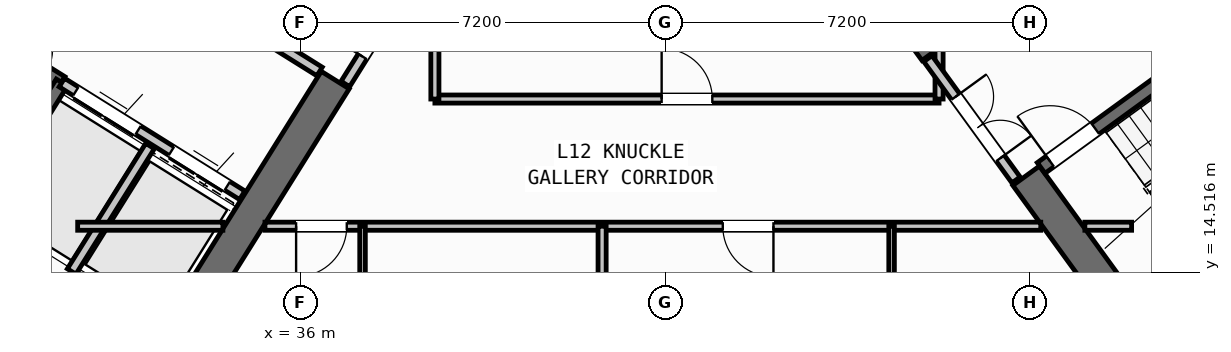
"""IFC4 building model, lengths in metres.
Left out: names, types, materials, properties, quantities, classifications, styles, units other than length and angle.
Written with IfcOpenShell. Run it as: python <this file> out.ifc"""

import sys

from ifc_helpers import new_model, si_unit, direction, frame, frame_2d, origin, place, context, subcontext, project, spatial, rectangle, extrude, source, transform, mapped, element, fill, save


model = new_model("IFC4")
c1 = context("Model", 3, precision=1e-05, world=origin(), true_north=direction((0.0, 1.0)))
c2 = subcontext(c1, "Body", "Model", "MODEL_VIEW")
j1 = project(units=[si_unit("LENGTHUNIT", "METRE"), si_unit("PLANEANGLEUNIT", "RADIAN")], contexts=[c1])
p1 = place(None, origin())
s1 = spatial("IfcSite", under=j1, at=p1, CompositionType="ELEMENT")
p2 = place(p1, origin())
s2 = spatial("IfcBuilding", under=s1, at=p2, CompositionType="ELEMENT")
p3 = place(p2, frame((0.0, 0.0, 49.2)))
s3 = spatial("IfcBuildingStorey", under=s2, at=p3, CompositionType="ELEMENT", Elevation=49.2)
p4 = place(p3, frame((33.409, 12.45, 0.0), z_axis=(0.0, 0.0, 1.0), x_axis=(-0.848051132073, 0.529914405721, 0.0)))
e1 = element("IfcWall", 1, at=p4, inside=s3, PredefinedType="SHEAR", context=c2, shape_type="SweptSolid", body=[
    extrude(rectangle(XDim=13.24, YDim=0.65, at=frame_2d((6.62, 0.0))), origin(), (0.0, 0.0, 1.0), 3.35),
])
p5 = place(p3, frame((36.683, 18.304, 0.0), z_axis=(0.0, 0.0, 1.0), x_axis=(-0.529899109053, -0.848060690178, 0.0)))
e2 = element("IfcWall", 2, at=p5, inside=s3, PredefinedType="SHEAR", context=c2, shape_type="SweptSolid", body=[
    extrude(rectangle(XDim=6.375, YDim=0.65, at=frame_2d((3.188, 0.0))), origin(), (0.0, 0.0, 1.0), 3.35),
])
p6 = place(p3, frame((52.318, 13.11, 0.0), z_axis=(0.0, 0.0, 1.0), x_axis=(0.809019445368, 0.587781878776, 0.0)))
e3 = element("IfcWall", 3, at=p6, inside=s3, PredefinedType="SHEAR", context=c2, shape_type="SweptSolid", body=[
    extrude(rectangle(XDim=12.44, YDim=0.65, at=frame_2d((6.22, 0.0))), origin(), (0.0, 0.0, 1.0), 3.35),
])
p7 = place(p3, frame((52.39, 13.564, 0.0), z_axis=(0.0, 0.0, 1.0), x_axis=(-0.58779688989, 0.809008539037, 0.0)))
e4 = element("IfcWall", 4, at=p7, inside=s3, PredefinedType="SHEAR", context=c2, shape_type="SweptSolid", body=[
    extrude(rectangle(XDim=3.525, YDim=0.65, at=frame_2d((1.763, 0.0))), origin(), (0.0, 0.0, 1.0), 3.35),
])
p8 = place(p3, frame((48.526, 18.884, 0.0), z_axis=(0.0, 0.0, 1.0), x_axis=(-0.58777996584, 0.809020835181, 0.0)))
e5 = element("IfcWall", 5, at=p8, inside=s3, PredefinedType="SHEAR", context=c2, shape_type="SweptSolid", body=[
    extrude(rectangle(XDim=6.375, YDim=0.65, at=frame_2d((3.188, 0.0))), origin(), (0.0, 0.0, 1.0), 3.35),
])
p9 = place(p3, frame((31.28, 18.261, 0.0), z_axis=(0.0, 0.0, 1.0), x_axis=(-0.848051618787, 0.529913626805, 0.0)))
e6 = element("IfcWall", 6, at=p9, inside=s3, PredefinedType="SHEAR", context=c2, shape_type="SweptSolid", body=[
    extrude(rectangle(XDim=7.46, YDim=0.26, at=frame_2d((3.73, 0.0))), origin(), (0.0, 0.0, 1.0), 3.35),
])
p10 = place(p9, frame((0.36, 0.0, 0.0)))
e7 = element("IfcOpeningElement", 7, at=p10, cuts=e6, PredefinedType="OPENING", context=c2, shape_type="SweptSolid", body=[
    extrude(rectangle(XDim=0.86, YDim=2.05, at=frame_2d((0.43, 1.025))), frame((0.0, 0.14, 0.0), z_axis=(0.0, -1.0, 0.0), x_axis=(1.0, 0.0, 0.0)), (0.0, 0.0, 1.0), 0.28),
])
p11 = place(p3, frame((31.288, 18.256, 0.0), z_axis=(0.0, 0.0, 1.0), x_axis=(-0.529943379326, -0.848033026897, 0.0)))
e8 = element("IfcWall", 8, at=p11, inside=s3, PredefinedType="SHEAR", context=c2, shape_type="SweptSolid", body=[
    extrude(rectangle(XDim=3.16, YDim=0.26, at=frame_2d((1.58, 0.0))), origin(), (0.0, 0.0, 1.0), 3.35),
])
p12 = place(p3, frame((34.848, 16.031, 0.0), z_axis=(0.0, 0.0, 1.0), x_axis=(-0.848044042236, 0.529925751807, 0.0)))
e9 = element("IfcWall", 9, at=p12, inside=s3, PredefinedType="STANDARD", context=c2, shape_type="SweptSolid", body=[
    extrude(rectangle(XDim=4.198, YDim=0.2, at=frame_2d((2.099, 0.0))), origin(), (0.0, 0.0, 1.0), 3.34),
])
p13 = place(p12, frame((0.348, 0.0, 0.0)))
e10 = element("IfcOpeningElement", 10, at=p13, cuts=e9, PredefinedType="OPENING", context=c2, shape_type="SweptSolid", body=[
    extrude(rectangle(XDim=1.3, YDim=2.2, at=frame_2d((0.65, 1.1))), frame((0.0, 0.11, 0.0), z_axis=(0.0, -1.0, 0.0), x_axis=(1.0, 0.0, 0.0)), (0.0, 0.0, 1.0), 0.22),
])
p14 = place(p12, frame((2.423, 0.0, 0.0)))
e11 = element("IfcOpeningElement", 11, at=p14, cuts=e9, PredefinedType="OPENING", context=c2, shape_type="SweptSolid", body=[
    extrude(rectangle(XDim=1.45, YDim=2.25, at=frame_2d((0.725, 1.125))), frame((0.0, 0.11, 0.0), z_axis=(0.0, -1.0, 0.0), x_axis=(1.0, 0.0, 0.0)), (0.0, 0.0, 1.0), 0.22),
])
p15 = place(p3, frame((36.374, 18.474, 0.0), z_axis=(0.0, 0.0, 1.0), x_axis=(-0.848051071577, 0.529914502535, 0.0)))
e12 = element("IfcWall", 12, at=p15, inside=s3, PredefinedType="STANDARD", context=c2, shape_type="SweptSolid", body=[
    extrude(rectangle(XDim=5.718, YDim=0.2, at=frame_2d((2.859, 0.0))), origin(), (0.0, 0.0, 1.0), 3.34),
])
p16 = place(p15, frame((2.498, 0.0, 0.0)))
e13 = element("IfcOpeningElement", 13, at=p16, cuts=e12, PredefinedType="OPENING", context=c2, shape_type="SweptSolid", body=[
    extrude(rectangle(XDim=1.15, YDim=2.1, at=frame_2d((0.575, 1.05))), frame((0.0, 0.11, 0.0), z_axis=(0.0, -1.0, 0.0), x_axis=(1.0, 0.0, 0.0)), (0.0, 0.0, 1.0), 0.22),
])
p17 = place(p3, frame((33.029, 17.003, 0.0), z_axis=(0.0, 0.0, 1.0), x_axis=(-0.529916267533, -0.848049968695, 0.0)))
e14 = element("IfcWall", 14, at=p17, inside=s3, PredefinedType="STANDARD", context=c2, shape_type="SweptSolid", body=[
    extrude(rectangle(XDim=2.92, YDim=0.2, at=frame_2d((1.46, 0.0))), origin(), (0.0, 0.0, 1.0), 3.34),
])
p18 = place(p3, frame((52.472, 14.013, 0.0), z_axis=(0.0, 0.0, 1.0), x_axis=(0.809028366311, 0.587769599847, 0.0)))
e15 = element("IfcWall", 15, at=p18, inside=s3, PredefinedType="SHEAR", context=c2, shape_type="SweptSolid", body=[
    extrude(rectangle(XDim=7.33, YDim=0.26, at=frame_2d((3.665, 0.0))), origin(), (0.0, 0.0, 1.0), 3.35),
])
p19 = place(p3, frame((50.615, 16.57, 0.0), z_axis=(0.0, 0.0, 1.0), x_axis=(0.809028366311, 0.587769599847, 0.0)))
e16 = element("IfcWall", 16, at=p19, inside=s3, PredefinedType="SHEAR", context=c2, shape_type="SweptSolid", body=[
    extrude(rectangle(XDim=7.33, YDim=0.26, at=frame_2d((3.665, 0.0))), origin(), (0.0, 0.0, 1.0), 3.35),
])
p20 = place(p19, frame((0.22, 0.0, 0.0)))
e17 = element("IfcOpeningElement", 17, at=p20, cuts=e16, PredefinedType="OPENING", context=c2, shape_type="SweptSolid", body=[
    extrude(rectangle(XDim=1.1, YDim=2.1, at=frame_2d((0.55, 1.05))), frame((0.0, 0.14, 0.0), z_axis=(0.0, -1.0, 0.0), x_axis=(1.0, 0.0, 0.0)), (0.0, 0.0, 1.0), 0.28),
])
p21 = place(p3, frame((32.164, 10.374, 0.0), z_axis=(0.0, 0.0, 1.0), x_axis=(-0.848044107957, 0.529925646633, 0.0)))
e18 = element("IfcWall", 18, at=p21, inside=s3, PredefinedType="PARTITIONING", context=c2, shape_type="SweptSolid", body=[
    extrude(rectangle(XDim=15.57, YDim=0.16, at=frame_2d((7.785, 0.0))), origin(), (0.0, 0.0, 1.0), 3.34),
])
p22 = place(p21, frame((10.83, 0.0, 0.0)))
e19 = element("IfcOpeningElement", 19, at=p22, cuts=e18, PredefinedType="OPENING", context=c2, shape_type="SweptSolid", body=[
    extrude(rectangle(XDim=1.0, YDim=2.1, at=frame_2d((0.5, 1.05))), frame((0.0, 0.09, 0.0), z_axis=(0.0, -1.0, 0.0), x_axis=(1.0, 0.0, 0.0)), (0.0, 0.0, 1.0), 0.18),
])
p23 = place(p3, frame((38.451, 20.737, 0.0), z_axis=(0.0, 0.0, 1.0), x_axis=(-0.529924799939, -0.848044637038, 0.0)))
e20 = element("IfcWall", 20, at=p23, inside=s3, PredefinedType="STANDARD", context=c2, shape_type="SweptSolid", body=[
    extrude(rectangle(XDim=2.96, YDim=0.2, at=frame_2d((1.48, 0.0))), origin(), (0.0, 0.0, 1.0), 3.34),
])
p24 = place(p23, frame((1.46, 0.0, 0.0)))
e21 = element("IfcOpeningElement", 21, at=p24, cuts=e20, PredefinedType="OPENING", context=c2, shape_type="SweptSolid", body=[
    extrude(rectangle(XDim=0.86, YDim=2.05, at=frame_2d((0.43, 1.025))), frame((0.0, 0.11, 0.0), z_axis=(0.0, -1.0, 0.0), x_axis=(1.0, 0.0, 0.0)), (0.0, 0.0, 1.0), 0.22),
])
p25 = place(p3, frame((31.6, 15.42, 0.0), z_axis=(0.0, 0.0, 1.0), x_axis=(1.0, 0.0, 0.0)))
e22 = element("IfcWall", 22, at=p25, inside=s3, PredefinedType="PARTITIONING", context=c2, shape_type="SweptSolid", body=[
    extrude(rectangle(XDim=2.866, YDim=0.16, at=frame_2d((1.433, 0.0))), origin(), (0.0, 0.0, 1.0), 3.34),
])
p26 = place(p3, frame((35.296, 15.42, 0.0), z_axis=(0.0, 0.0, 1.0), x_axis=(1.0, 0.0, 0.0)))
e23 = element("IfcWall", 23, at=p26, inside=s3, PredefinedType="PARTITIONING", context=c2, shape_type="SweptSolid", body=[
    extrude(rectangle(XDim=15.311, YDim=0.16, at=frame_2d((7.655, 0.0))), origin(), (0.0, 0.0, 1.0), 3.34),
])
p27 = place(p26, frame((0.615, 0.0, 0.0)))
e24 = element("IfcOpeningElement", 24, at=p27, cuts=e23, PredefinedType="OPENING", context=c2, shape_type="SweptSolid", body=[
    extrude(rectangle(XDim=1.0, YDim=2.1, at=frame_2d((0.5, 1.05))), frame((0.0, 0.09, 0.0), z_axis=(0.0, -1.0, 0.0), x_axis=(1.0, 0.0, 0.0)), (0.0, 0.0, 1.0), 0.18),
])
p28 = place(p26, frame((9.035, 0.0, 0.0)))
e25 = element("IfcOpeningElement", 25, at=p28, cuts=e23, PredefinedType="OPENING", context=c2, shape_type="SweptSolid", body=[
    extrude(rectangle(XDim=1.0, YDim=2.1, at=frame_2d((0.5, 1.05))), frame((0.0, 0.09, 0.0), z_axis=(0.0, -1.0, 0.0), x_axis=(1.0, 0.0, 0.0)), (0.0, 0.0, 1.0), 0.18),
])
p29 = place(p3, frame((51.477, 15.42, 0.0), z_axis=(0.0, 0.0, 1.0), x_axis=(1.0, 0.0, 0.0)))
e26 = element("IfcWall", 26, at=p29, inside=s3, PredefinedType="PARTITIONING", context=c2, shape_type="SweptSolid", body=[
    extrude(rectangle(XDim=0.923, YDim=0.16, at=frame_2d((0.461, 0.0))), origin(), (0.0, 0.0, 1.0), 3.34),
])
p30 = place(p3, frame((38.65, 17.93, 0.0), z_axis=(0.0, 0.0, 1.0), x_axis=(1.0, 0.0, 0.0)))
e27 = element("IfcWall", 27, at=p30, inside=s3, PredefinedType="PARTITIONING", context=c2, shape_type="SweptSolid", body=[
    extrude(rectangle(XDim=9.95, YDim=0.16, at=frame_2d((4.975, 0.0))), origin(), (0.0, 0.0, 1.0), 3.34),
])
p31 = place(p30, frame((4.475, 0.0, 0.0)))
e28 = element("IfcOpeningElement", 28, at=p31, cuts=e27, PredefinedType="OPENING", context=c2, shape_type="SweptSolid", body=[
    extrude(rectangle(XDim=1.0, YDim=2.1, at=frame_2d((0.5, 1.05))), frame((0.0, 0.09, 0.0), z_axis=(0.0, -1.0, 0.0), x_axis=(1.0, 0.0, 0.0)), (0.0, 0.0, 1.0), 0.18),
])
p32 = place(p3, frame((38.65, 17.93, 0.0), z_axis=(0.0, 0.0, 1.0), x_axis=(0.0, 1.0, 0.0)))
e29 = element("IfcWall", 29, at=p32, inside=s3, PredefinedType="PARTITIONING", context=c2, shape_type="SweptSolid", body=[
    extrude(rectangle(XDim=2.857, YDim=0.16, at=frame_2d((1.428, 0.0))), origin(), (0.0, 0.0, 1.0), 3.34),
])
p33 = place(p3, frame((48.6, 17.93, 0.0), z_axis=(0.0, 0.0, 1.0), x_axis=(0.0, 1.0, 0.0)))
e30 = element("IfcWall", 30, at=p33, inside=s3, PredefinedType="PARTITIONING", context=c2, shape_type="SweptSolid", body=[
    extrude(rectangle(XDim=0.993, YDim=0.16, at=frame_2d((0.496, 0.0))), origin(), (0.0, 0.0, 1.0), 3.34),
])
p34 = place(p3, frame((50.119, 16.333, 0.0), z_axis=(0.0, 0.0, 1.0), x_axis=(-0.587749856981, 0.809042709391, 0.0)))
e31 = element("IfcWall", 31, at=p34, inside=s3, PredefinedType="STANDARD", context=c2, shape_type="SweptSolid", body=[
    extrude(rectangle(XDim=2.96, YDim=0.2, at=frame_2d((1.48, 0.0))), origin(), (0.0, 0.0, 1.0), 3.34),
])
p35 = place(p34, frame((0.53, 0.0, 0.0)))
e32 = element("IfcOpeningElement", 32, at=p35, cuts=e31, PredefinedType="OPENING", context=c2, shape_type="SweptSolid", body=[
    extrude(rectangle(XDim=1.5, YDim=2.15, at=frame_2d((0.75, 1.075))), frame((0.0, 0.11, 0.0), z_axis=(0.0, -1.0, 0.0), x_axis=(1.0, 0.0, 0.0)), (0.0, 0.0, 1.0), 0.22),
])
p36 = place(p3, frame((41.95, 1.96, 0.0), z_axis=(0.0, 0.0, 1.0), x_axis=(0.0, 1.0, 0.0)))
e33 = element("IfcWall", 33, at=p36, inside=s3, PredefinedType="PARTITIONING", context=c2, shape_type="SweptSolid", body=[
    extrude(rectangle(XDim=13.46, YDim=0.16, at=frame_2d((6.73, 0.0))), origin(), (0.0, 0.0, 1.0), 3.34),
])
p37 = place(p3, frame((37.222, 1.96, 0.0), z_axis=(0.0, 0.0, 1.0), x_axis=(0.0, 1.0, 0.0)))
e34 = element("IfcWall", 34, at=p37, inside=s3, PredefinedType="PARTITIONING", context=c2, shape_type="SweptSolid", body=[
    extrude(rectangle(XDim=13.46, YDim=0.11, at=frame_2d((6.73, 0.0))), origin(), (0.0, 0.0, 1.0), 3.34),
])
p38 = place(p37, frame((5.2, 0.0, 0.0)))
e35 = element("IfcOpeningElement", 35, at=p38, cuts=e34, PredefinedType="OPENING", context=c2, shape_type="SweptSolid", body=[
    extrude(rectangle(XDim=0.92, YDim=2.08, at=frame_2d((0.46, 1.04))), frame((0.0, 0.065, 0.0), z_axis=(0.0, -1.0, 0.0), x_axis=(1.0, 0.0, 0.0)), (0.0, 0.0, 1.0), 0.13),
])
p39 = place(p37, frame((10.89, 0.0, 0.0)))
e36 = element("IfcOpeningElement", 36, at=p39, cuts=e34, PredefinedType="OPENING", context=c2, shape_type="SweptSolid", body=[
    extrude(rectangle(XDim=0.88, YDim=2.08, at=frame_2d((0.44, 1.04))), frame((0.0, 0.065, 0.0), z_axis=(0.0, -1.0, 0.0), x_axis=(1.0, 0.0, 0.0)), (0.0, 0.0, 1.0), 0.13),
])
p40 = place(p3, frame((47.663, 1.96, 0.0), z_axis=(0.0, 0.0, 1.0), x_axis=(0.0, 1.0, 0.0)))
e37 = element("IfcWall", 37, at=p40, inside=s3, PredefinedType="PARTITIONING", context=c2, shape_type="SweptSolid", body=[
    extrude(rectangle(XDim=13.46, YDim=0.11, at=frame_2d((6.73, 0.0))), origin(), (0.0, 0.0, 1.0), 3.34),
])
p41 = place(p40, frame((6.3, 0.0, 0.0)))
e38 = element("IfcOpeningElement", 38, at=p41, cuts=e37, PredefinedType="OPENING", context=c2, shape_type="SweptSolid", body=[
    extrude(rectangle(XDim=0.92, YDim=2.08, at=frame_2d((0.46, 1.04))), frame((0.0, 0.065, 0.0), z_axis=(0.0, -1.0, 0.0), x_axis=(1.0, 0.0, 0.0)), (0.0, 0.0, 1.0), 0.13),
])
p42 = place(p40, frame((11.54, 0.0, 0.0)))
e39 = element("IfcOpeningElement", 39, at=p42, cuts=e37, PredefinedType="OPENING", context=c2, shape_type="SweptSolid", body=[
    extrude(rectangle(XDim=0.88, YDim=2.08, at=frame_2d((0.44, 1.04))), frame((0.0, 0.065, 0.0), z_axis=(0.0, -1.0, 0.0), x_axis=(1.0, 0.0, 0.0)), (0.0, 0.0, 1.0), 0.13),
])
m1 = source(origin(), c2, "Body", "SweptSolid", [
    extrude(rectangle(XDim=1.3, YDim=2.2, at=frame_2d((0.65, 1.1))), frame((0.0, 0.025, 0.0), z_axis=(0.0, -1.0, 0.0), x_axis=(1.0, 0.0, 0.0)), (0.0, 0.0, 1.0), 0.05),
])
p43 = place(p13, origin())
e40 = element("IfcDoor", 40, at=p43, inside=s3, OperationType="DOUBLE_DOOR_SLIDING", PredefinedType="DOOR", context=c2, shape_type="MappedRepresentation", body=[
    mapped(m1, transform((0.0, 0.0, 0.0), scale=1.0)),
])
fill(e10, e40)
m2 = source(origin(), c2, "Body", "SweptSolid", [
    extrude(rectangle(XDim=1.45, YDim=2.25, at=frame_2d((0.725, 1.125))), frame((0.0, 0.025, 0.0), z_axis=(0.0, -1.0, 0.0), x_axis=(1.0, 0.0, 0.0)), (0.0, 0.0, 1.0), 0.05),
])
p44 = place(p14, origin())
e41 = element("IfcDoor", 41, at=p44, inside=s3, OperationType="DOUBLE_DOOR_SLIDING", PredefinedType="DOOR", context=c2, shape_type="MappedRepresentation", body=[
    mapped(m2, transform((0.0, 0.0, 0.0), scale=1.0)),
])
fill(e11, e41)
m3 = source(origin(), c2, "Body", "SweptSolid", [
    extrude(rectangle(XDim=1.1, YDim=2.1, at=frame_2d((0.55, 1.05))), frame((0.0, 0.025, 0.0), z_axis=(0.0, -1.0, 0.0), x_axis=(1.0, 0.0, 0.0)), (0.0, 0.0, 1.0), 0.05),
])
p45 = place(p20, origin())
e42 = element("IfcDoor", 42, at=p45, inside=s3, OperationType="SINGLE_SWING_LEFT", PredefinedType="DOOR", context=c2, shape_type="MappedRepresentation", body=[
    mapped(m3, transform((0.0, 0.0, 0.0), scale=1.0)),
])
fill(e17, e42)
m4 = source(origin(), c2, "Body", "SweptSolid", [
    extrude(rectangle(XDim=1.0, YDim=2.1, at=frame_2d((0.5, 1.05))), frame((0.0, 0.025, 0.0), z_axis=(0.0, -1.0, 0.0), x_axis=(1.0, 0.0, 0.0)), (0.0, 0.0, 1.0), 0.05),
])
p46 = place(p31, origin())
e43 = element("IfcDoor", 43, at=p46, inside=s3, OperationType="SINGLE_SWING_LEFT", PredefinedType="DOOR", context=c2, shape_type="MappedRepresentation", body=[
    mapped(m4, transform((0.0, 0.0, 0.0), scale=1.0)),
])
fill(e28, e43)
m5 = source(origin(), c2, "Body", "SweptSolid", [
    extrude(rectangle(XDim=0.86, YDim=2.05, at=frame_2d((0.43, 1.025))), frame((0.0, 0.025, 0.0), z_axis=(0.0, -1.0, 0.0), x_axis=(1.0, 0.0, 0.0)), (0.0, 0.0, 1.0), 0.05),
])
p47 = place(p24, frame((0.86, 0.0, 0.0), z_axis=(0.0, 0.0, 1.0), x_axis=(-1.0, 0.0, 0.0)))
e44 = element("IfcDoor", 44, at=p47, inside=s3, OperationType="SINGLE_SWING_LEFT", PredefinedType="DOOR", context=c2, shape_type="MappedRepresentation", body=[
    mapped(m5, transform((0.0, 0.0, 0.0), scale=1.0)),
])
fill(e21, e44)
m6 = source(origin(), c2, "Body", "SweptSolid", [
    extrude(rectangle(XDim=1.5, YDim=2.15, at=frame_2d((0.75, 1.075))), frame((0.0, 0.025, 0.0), z_axis=(0.0, -1.0, 0.0), x_axis=(1.0, 0.0, 0.0)), (0.0, 0.0, 1.0), 0.05),
])
p48 = place(p35, frame((1.5, 0.0, 0.0), z_axis=(0.0, 0.0, 1.0), x_axis=(-1.0, 0.0, 0.0)))
e45 = element("IfcDoor", 45, at=p48, inside=s3, OperationType="DOUBLE_DOOR_SINGLE_SWING", PredefinedType="DOOR", context=c2, shape_type="MappedRepresentation", body=[
    mapped(m6, transform((0.0, 0.0, 0.0), scale=1.0)),
])
fill(e32, e45)
p49 = place(p27, frame((1.0, 0.0, 0.0), z_axis=(0.0, 0.0, 1.0), x_axis=(-1.0, 0.0, 0.0)))
e46 = element("IfcDoor", 46, at=p49, inside=s3, OperationType="SINGLE_SWING_RIGHT", PredefinedType="DOOR", context=c2, shape_type="MappedRepresentation", body=[
    mapped(m4, transform((0.0, 0.0, 0.0), scale=1.0)),
])
fill(e24, e46)
p50 = place(p28, frame((1.0, 0.0, 0.0), z_axis=(0.0, 0.0, 1.0), x_axis=(-1.0, 0.0, 0.0)))
e47 = element("IfcDoor", 47, at=p50, inside=s3, OperationType="SINGLE_SWING_LEFT", PredefinedType="DOOR", context=c2, shape_type="MappedRepresentation", body=[
    mapped(m4, transform((0.0, 0.0, 0.0), scale=1.0)),
])
fill(e25, e47)
save(model, sys.argv[1])
